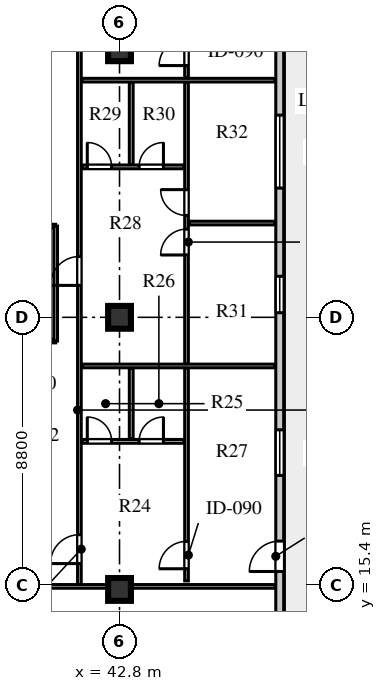
"""IFC4 building model, lengths in metres.
Left out: names, types, materials, properties, quantities, classifications, styles, units other than length and angle.
Written with IfcOpenShell. Run it as: python <this file> out.ifc"""

import sys

from ifc_helpers import new_model, si_unit, direction, frame, frame_2d, origin, origin_2d, place, context, subcontext, project, spatial, rectangle, extrude, element, fill, save


model = new_model("IFC4")
c1 = context("Model", 3, precision=1e-05, world=origin(), true_north=direction((0.0, 1.0)))
c2 = subcontext(c1, "Body", "Model", "MODEL_VIEW")
j1 = project(units=[si_unit("LENGTHUNIT", "METRE"), si_unit("PLANEANGLEUNIT", "RADIAN")], contexts=[c1])
p1 = place(None, origin())
s1 = spatial("IfcSite", under=j1, at=p1, CompositionType="ELEMENT")
p2 = place(p1, origin())
s2 = spatial("IfcBuilding", under=s1, at=p2, CompositionType="ELEMENT")
p3 = place(p2, frame((0.0, 0.0, 288.2)))
s3 = spatial("IfcBuildingStorey", under=s2, at=p3, CompositionType="ELEMENT", Elevation=288.2)
for number, where, z_axis, x_axis in (
    (1, (42.8, 15.25, 0.0), (0.0, 0.0, 1.0), (1.0, 0.0, 0.0)),
    (2, (42.8, 24.2, 0.0), (0.0, 0.0, 1.0), (1.0, 0.0, 0.0)),
    (3, (42.8, 33.0, 0.0), (0.0, 0.0, 1.0), (1.0, 0.0, 0.0)),
):
    element("IfcColumn", number, at=place(p3, frame(where, z_axis=z_axis, x_axis=x_axis)), inside=s3, PredefinedType="COLUMN", context=c2, shape_type="SweptSolid", body=[
        extrude(rectangle(XDim=0.75, YDim=0.75, at=origin_2d()), origin(), (0.0, 0.0, 1.0), 3.66),
    ])
p4 = place(p3, frame((48.07, 13.41, 0.0), z_axis=(0.0, 0.0, 1.0), x_axis=(0.0, 1.0, 0.0)))
e4 = element("IfcWall", 4, at=p4, inside=s3, PredefinedType="SOLIDWALL", context=c2, shape_type="SweptSolid", body=[
    extrude(rectangle(XDim=30.38, YDim=0.26, at=frame_2d((15.19, 0.0))), origin(), (0.0, 0.0, 1.0), 3.66),
])
p5 = place(p4, frame((2.43, 0.0, 0.0)))
e5 = element("IfcOpeningElement", 5, at=p5, cuts=e4, PredefinedType="OPENING", context=c2, shape_type="SweptSolid", body=[
    extrude(rectangle(XDim=1.0, YDim=2.05, at=frame_2d((0.5, 1.025))), frame((0.0, 0.14, 0.0), z_axis=(0.0, -1.0, 0.0), x_axis=(1.0, 0.0, 0.0)), (0.0, 0.0, 1.0), 0.28),
])
p6 = place(p4, frame((5.59, 0.0, 0.8)))
e6 = element("IfcOpeningElement", 6, at=p6, cuts=e4, PredefinedType="OPENING", context=c2, shape_type="SweptSolid", body=[
    extrude(rectangle(XDim=1.5, YDim=2.0, at=frame_2d((0.75, 1.0))), frame((0.0, 0.14, 0.0), z_axis=(0.0, -1.0, 0.0), x_axis=(1.0, 0.0, 0.0)), (0.0, 0.0, 1.0), 0.28),
])
p7 = place(p4, frame((10.94, 0.0, 0.8)))
e7 = element("IfcOpeningElement", 7, at=p7, cuts=e4, PredefinedType="OPENING", context=c2, shape_type="SweptSolid", body=[
    extrude(rectangle(XDim=1.2, YDim=1.75, at=frame_2d((0.6, 0.875))), frame((0.0, 0.14, 0.0), z_axis=(0.0, -1.0, 0.0), x_axis=(1.0, 0.0, 0.0)), (0.0, 0.0, 1.0), 0.28),
])
p8 = place(p4, frame((15.04, 0.0, 0.8)))
e8 = element("IfcOpeningElement", 8, at=p8, cuts=e4, PredefinedType="OPENING", context=c2, shape_type="SweptSolid", body=[
    extrude(rectangle(XDim=2.4, YDim=2.05, at=frame_2d((1.2, 1.025))), frame((0.0, 0.14, 0.0), z_axis=(0.0, -1.0, 0.0), x_axis=(1.0, 0.0, 0.0)), (0.0, 0.0, 1.0), 0.28),
])
p9 = place(p4, frame((22.465, 0.0, 0.8)))
e9 = element("IfcOpeningElement", 9, at=p9, cuts=e4, PredefinedType="OPENING", context=c2, shape_type="SweptSolid", body=[
    extrude(rectangle(XDim=2.1, YDim=1.95, at=frame_2d((1.05, 0.975))), frame((0.0, 0.14, 0.0), z_axis=(0.0, -1.0, 0.0), x_axis=(1.0, 0.0, 0.0)), (0.0, 0.0, 1.0), 0.28),
])
p10 = place(p3, frame((41.48, 15.35, 0.0), z_axis=(0.0, 0.0, 1.0), x_axis=(0.0, 1.0, 0.0)))
e10 = element("IfcWall", 10, at=p10, inside=s3, PredefinedType="PARTITIONING", context=c2, shape_type="SweptSolid", body=[
    extrude(rectangle(XDim=26.5, YDim=0.12, at=frame_2d((13.25, 0.0))), origin(), (0.0, 0.0, 1.0), 3.66),
])
p11 = place(p10, frame((0.75, 0.0, 0.0)))
e11 = element("IfcOpeningElement", 11, at=p11, cuts=e10, PredefinedType="OPENING", context=c2, shape_type="SweptSolid", body=[
    extrude(rectangle(XDim=0.95, YDim=2.1, at=frame_2d((0.475, 1.05))), frame((0.0, 0.07, 0.0), z_axis=(0.0, -1.0, 0.0), x_axis=(1.0, 0.0, 0.0)), (0.0, 0.0, 1.0), 0.14),
])
p12 = place(p10, frame((9.9, 0.0, 0.0)))
e12 = element("IfcOpeningElement", 12, at=p12, cuts=e10, PredefinedType="OPENING", context=c2, shape_type="SweptSolid", body=[
    extrude(rectangle(XDim=0.95, YDim=2.1, at=frame_2d((0.475, 1.05))), frame((0.0, 0.07, 0.0), z_axis=(0.0, -1.0, 0.0), x_axis=(1.0, 0.0, 0.0)), (0.0, 0.0, 1.0), 0.14),
])
p13 = place(p10, frame((18.35, 0.0, 0.0)))
e13 = element("IfcOpeningElement", 13, at=p13, cuts=e10, PredefinedType="OPENING", context=c2, shape_type="SweptSolid", body=[
    extrude(rectangle(XDim=0.95, YDim=2.1, at=frame_2d((0.475, 1.05))), frame((0.0, 0.07, 0.0), z_axis=(0.0, -1.0, 0.0), x_axis=(1.0, 0.0, 0.0)), (0.0, 0.0, 1.0), 0.14),
])
p14 = place(p3, frame((39.15, 15.35, 0.0), z_axis=(0.0, 0.0, 1.0), x_axis=(1.0, 0.0, 0.0)))
e14 = element("IfcWall", 14, at=p14, inside=s3, PredefinedType="PARTITIONING", context=c2, shape_type="SweptSolid", body=[
    extrude(rectangle(XDim=8.77, YDim=0.12, at=frame_2d((4.385, 0.0))), origin(), (0.0, 0.0, 1.0), 3.06),
])
p15 = place(p3, frame((45.004, 15.53, 0.0), z_axis=(0.0, 0.0, 1.0), x_axis=(0.0, 1.0, 0.0)))
e15 = element("IfcWall", 15, at=p15, inside=s3, PredefinedType="PARTITIONING", context=c2, shape_type="SweptSolid", body=[
    extrude(rectangle(XDim=6.99, YDim=0.12, at=frame_2d((3.495, 0.0))), origin(), (0.0, 0.0, 1.0), 3.66),
])
p16 = place(p15, frame((0.4, 0.0, 0.0)))
e16 = element("IfcOpeningElement", 16, at=p16, cuts=e15, PredefinedType="OPENING", context=c2, shape_type="SweptSolid", body=[
    extrude(rectangle(XDim=0.9, YDim=2.08, at=frame_2d((0.45, 1.04))), frame((0.0, 0.07, 0.0), z_axis=(0.0, -1.0, 0.0), x_axis=(1.0, 0.0, 0.0)), (0.0, 0.0, 1.0), 0.14),
])
p17 = place(p3, frame((41.58, 20.12, 0.0), z_axis=(0.0, 0.0, 1.0), x_axis=(1.0, 0.0, 0.0)))
e17 = element("IfcWall", 17, at=p17, inside=s3, PredefinedType="PLUMBINGWALL", context=c2, shape_type="SweptSolid", body=[
    extrude(rectangle(XDim=3.344, YDim=0.125, at=frame_2d((1.672, 0.0))), origin(), (0.0, 0.0, 1.0), 3.66),
])
p18 = place(p17, frame((0.16, 0.0, 0.0)))
e18 = element("IfcOpeningElement", 18, at=p18, cuts=e17, PredefinedType="OPENING", context=c2, shape_type="SweptSolid", body=[
    extrude(rectangle(XDim=0.8, YDim=2.05, at=frame_2d((0.4, 1.025))), frame((0.0, 0.073, 0.0), z_axis=(0.0, -1.0, 0.0), x_axis=(1.0, 0.0, 0.0)), (0.0, 0.0, 1.0), 0.145),
])
p19 = place(p17, frame((1.865, 0.0, 0.0)))
e19 = element("IfcOpeningElement", 19, at=p19, cuts=e17, PredefinedType="OPENING", context=c2, shape_type="SweptSolid", body=[
    extrude(rectangle(XDim=0.8, YDim=2.05, at=frame_2d((0.4, 1.025))), frame((0.0, 0.073, 0.0), z_axis=(0.0, -1.0, 0.0), x_axis=(1.0, 0.0, 0.0)), (0.0, 0.0, 1.0), 0.145),
])
p20 = place(p3, frame((43.185, 20.2, 0.0), z_axis=(0.0, 0.0, 1.0), x_axis=(0.0, 1.0, 0.0)))
e20 = element("IfcWall", 20, at=p20, inside=s3, PredefinedType="PLUMBINGWALL", context=c2, shape_type="SweptSolid", body=[
    extrude(rectangle(XDim=2.32, YDim=0.125, at=frame_2d((1.16, 0.0))), origin(), (0.0, 0.0, 1.0), 3.66),
])
p21 = place(p3, frame((41.56, 22.6, 0.0), z_axis=(0.0, 0.0, 1.0), x_axis=(1.0, 0.0, 0.0)))
e21 = element("IfcWall", 21, at=p21, inside=s3, PredefinedType="PARTITIONING", context=c2, shape_type="SweptSolid", body=[
    extrude(rectangle(XDim=6.36, YDim=0.12, at=frame_2d((3.18, 0.0))), origin(), (0.0, 0.0, 1.0), 3.66),
])
p22 = place(p3, frame((45.004, 22.68, 0.0), z_axis=(0.0, 0.0, 1.0), x_axis=(0.0, 1.0, 0.0)))
e22 = element("IfcWall", 22, at=p22, inside=s3, PredefinedType="PARTITIONING", context=c2, shape_type="SweptSolid", body=[
    extrude(rectangle(XDim=9.24, YDim=0.12, at=frame_2d((4.62, 0.0))), origin(), (0.0, 0.0, 1.0), 3.66),
])
p23 = place(p22, frame((3.57, 0.0, 0.0)))
e23 = element("IfcOpeningElement", 23, at=p23, cuts=e22, PredefinedType="OPENING", context=c2, shape_type="SweptSolid", body=[
    extrude(rectangle(XDim=0.85, YDim=2.08, at=frame_2d((0.425, 1.04))), frame((0.0, 0.07, 0.0), z_axis=(0.0, -1.0, 0.0), x_axis=(1.0, 0.0, 0.0)), (0.0, 0.0, 1.0), 0.14),
])
p24 = place(p22, frame((4.87, 0.0, 0.0)))
e24 = element("IfcOpeningElement", 24, at=p24, cuts=e22, PredefinedType="OPENING", context=c2, shape_type="SweptSolid", body=[
    extrude(rectangle(XDim=0.85, YDim=2.08, at=frame_2d((0.425, 1.04))), frame((0.0, 0.07, 0.0), z_axis=(0.0, -1.0, 0.0), x_axis=(1.0, 0.0, 0.0)), (0.0, 0.0, 1.0), 0.14),
])
p25 = place(p3, frame((41.58, 29.148, 0.0), z_axis=(0.0, 0.0, 1.0), x_axis=(1.0, 0.0, 0.0)))
e25 = element("IfcWall", 25, at=p25, inside=s3, PredefinedType="PLUMBINGWALL", context=c2, shape_type="SweptSolid", body=[
    extrude(rectangle(XDim=3.344, YDim=0.125, at=frame_2d((1.672, 0.0))), origin(), (0.0, 0.0, 1.0), 3.66),
])
p26 = place(p25, frame((0.16, 0.0, 0.0)))
e26 = element("IfcOpeningElement", 26, at=p26, cuts=e25, PredefinedType="OPENING", context=c2, shape_type="SweptSolid", body=[
    extrude(rectangle(XDim=0.8, YDim=2.05, at=frame_2d((0.4, 1.025))), frame((0.0, 0.073, 0.0), z_axis=(0.0, -1.0, 0.0), x_axis=(1.0, 0.0, 0.0)), (0.0, 0.0, 1.0), 0.145),
])
p27 = place(p25, frame((1.865, 0.0, 0.0)))
e27 = element("IfcOpeningElement", 27, at=p27, cuts=e25, PredefinedType="OPENING", context=c2, shape_type="SweptSolid", body=[
    extrude(rectangle(XDim=0.8, YDim=2.05, at=frame_2d((0.4, 1.025))), frame((0.0, 0.073, 0.0), z_axis=(0.0, -1.0, 0.0), x_axis=(1.0, 0.0, 0.0)), (0.0, 0.0, 1.0), 0.145),
])
p28 = place(p3, frame((43.185, 29.228, 0.0), z_axis=(0.0, 0.0, 1.0), x_axis=(0.0, 1.0, 0.0)))
e28 = element("IfcWall", 28, at=p28, inside=s3, PredefinedType="PLUMBINGWALL", context=c2, shape_type="SweptSolid", body=[
    extrude(rectangle(XDim=2.692, YDim=0.125, at=frame_2d((1.346, 0.0))), origin(), (0.0, 0.0, 1.0), 3.66),
])
p29 = place(p3, frame((45.084, 27.3, 0.0), z_axis=(0.0, 0.0, 1.0), x_axis=(1.0, 0.0, 0.0)))
e29 = element("IfcWall", 29, at=p29, inside=s3, PredefinedType="PARTITIONING", context=c2, shape_type="SweptSolid", body=[
    extrude(rectangle(XDim=2.836, YDim=0.12, at=frame_2d((1.418, 0.0))), origin(), (0.0, 0.0, 1.0), 3.66),
])
p30 = place(p3, frame((41.56, 32.0, 0.0), z_axis=(0.0, 0.0, 1.0), x_axis=(1.0, 0.0, 0.0)))
e30 = element("IfcWall", 30, at=p30, inside=s3, PredefinedType="PARTITIONING", context=c2, shape_type="SweptSolid", body=[
    extrude(rectangle(XDim=6.36, YDim=0.12, at=frame_2d((3.18, 0.0))), origin(), (0.0, 0.0, 1.0), 3.66),
])
p31 = place(p3, frame((45.004, 32.08, 0.0), z_axis=(0.0, 0.0, 1.0), x_axis=(0.0, 1.0, 0.0)))
e31 = element("IfcWall", 31, at=p31, inside=s3, PredefinedType="PARTITIONING", context=c2, shape_type="SweptSolid", body=[
    extrude(rectangle(XDim=9.59, YDim=0.12, at=frame_2d((4.795, 0.0))), origin(), (0.0, 0.0, 1.0), 3.66),
])
p32 = place(p31, frame((0.4, 0.0, 0.0)))
e32 = element("IfcOpeningElement", 32, at=p32, cuts=e31, PredefinedType="OPENING", context=c2, shape_type="SweptSolid", body=[
    extrude(rectangle(XDim=0.9, YDim=2.08, at=frame_2d((0.45, 1.04))), frame((0.0, 0.07, 0.0), z_axis=(0.0, -1.0, 0.0), x_axis=(1.0, 0.0, 0.0)), (0.0, 0.0, 1.0), 0.14),
])
p33 = place(p3, frame((34.8, 23.42, 0.0), z_axis=(0.0, 0.0, 1.0), x_axis=(1.0, 0.0, 0.0)))
e33 = element("IfcWall", 33, at=p33, inside=s3, PredefinedType="PARTITIONING", context=c2, shape_type="SweptSolid", body=[
    extrude(rectangle(XDim=5.9, YDim=0.12, at=frame_2d((2.95, 0.0))), origin(), (0.0, 0.0, 1.0), 3.66),
])
p34 = place(p33, frame((0.43, 0.0, 0.0)))
e34 = element("IfcOpeningElement", 34, at=p34, cuts=e33, PredefinedType="OPENING", context=c2, shape_type="SweptSolid", body=[
    extrude(rectangle(XDim=0.8, YDim=2.05, at=frame_2d((0.4, 1.025))), frame((0.0, 0.07, 0.0), z_axis=(0.0, -1.0, 0.0), x_axis=(1.0, 0.0, 0.0)), (0.0, 0.0, 1.0), 0.14),
])
p35 = place(p33, frame((3.3, 0.0, 0.0)))
e35 = element("IfcOpeningElement", 35, at=p35, cuts=e33, PredefinedType="OPENING", context=c2, shape_type="SweptSolid", body=[
    extrude(rectangle(XDim=0.8, YDim=2.05, at=frame_2d((0.4, 1.025))), frame((0.0, 0.07, 0.0), z_axis=(0.0, -1.0, 0.0), x_axis=(1.0, 0.0, 0.0)), (0.0, 0.0, 1.0), 0.14),
])
p36 = place(p3, frame((34.8, 27.2, 0.0), z_axis=(0.0, 0.0, 1.0), x_axis=(1.0, 0.0, 0.0)))
e36 = element("IfcWall", 36, at=p36, inside=s3, PredefinedType="PARTITIONING", context=c2, shape_type="SweptSolid", body=[
    extrude(rectangle(XDim=5.9, YDim=0.12, at=frame_2d((2.95, 0.0))), origin(), (0.0, 0.0, 1.0), 3.36),
])
p37 = place(p3, frame((40.7, 23.42, 0.0), z_axis=(0.0, 0.0, 1.0), x_axis=(0.0, 1.0, 0.0)))
e37 = element("IfcWall", 37, at=p37, inside=s3, PredefinedType="PARTITIONING", context=c2, shape_type="SweptSolid", body=[
    extrude(rectangle(XDim=3.78, YDim=0.12, at=frame_2d((1.89, 0.0))), origin(), (0.0, 0.0, 1.0), 3.66),
])
p38 = place(p5, frame((1.0, 0.0, 0.0), z_axis=(0.0, 0.0, 1.0), x_axis=(-1.0, 0.0, 0.0)))
e38 = element("IfcDoor", 38, at=p38, inside=s3, OperationType="SINGLE_SWING_RIGHT", PredefinedType="DOOR", context=c2, shape_type="SweptSolid", body=[
    extrude(rectangle(XDim=1.0, YDim=2.05, at=frame_2d((0.5, 1.025))), frame((0.0, 0.025, 0.0), z_axis=(0.0, -1.0, 0.0), x_axis=(1.0, 0.0, 0.0)), (0.0, 0.0, 1.0), 0.05),
])
fill(e5, e38)
p39 = place(p6, origin())
e39 = element("IfcWindow", 39, at=p39, inside=s3, PartitioningType="SINGLE_PANEL", PredefinedType="WINDOW", context=c2, shape_type="SweptSolid", body=[
    extrude(rectangle(XDim=1.5, YDim=2.0, at=frame_2d((0.75, 1.0))), frame((0.0, 0.03, 0.0), z_axis=(0.0, -1.0, 0.0), x_axis=(1.0, 0.0, 0.0)), (0.0, 0.0, 1.0), 0.06),
])
fill(e6, e39)
p40 = place(p7, origin())
e40 = element("IfcWindow", 40, at=p40, inside=s3, PartitioningType="SINGLE_PANEL", PredefinedType="WINDOW", context=c2, shape_type="SweptSolid", body=[
    extrude(rectangle(XDim=1.2, YDim=1.75, at=frame_2d((0.6, 0.875))), frame((0.0, 0.03, 0.0), z_axis=(0.0, -1.0, 0.0), x_axis=(1.0, 0.0, 0.0)), (0.0, 0.0, 1.0), 0.06),
])
fill(e7, e40)
p41 = place(p8, origin())
e41 = element("IfcWindow", 41, at=p41, inside=s3, PartitioningType="SINGLE_PANEL", PredefinedType="WINDOW", context=c2, shape_type="SweptSolid", body=[
    extrude(rectangle(XDim=2.4, YDim=2.05, at=frame_2d((1.2, 1.025))), frame((0.0, 0.03, 0.0), z_axis=(0.0, -1.0, 0.0), x_axis=(1.0, 0.0, 0.0)), (0.0, 0.0, 1.0), 0.06),
])
fill(e8, e41)
p42 = place(p18, origin())
e42 = element("IfcDoor", 42, at=p42, inside=s3, OperationType="SINGLE_SWING_LEFT", PredefinedType="DOOR", context=c2, shape_type="SweptSolid", body=[
    extrude(rectangle(XDim=0.8, YDim=2.05, at=frame_2d((0.4, 1.025))), frame((0.0, 0.025, 0.0), z_axis=(0.0, -1.0, 0.0), x_axis=(1.0, 0.0, 0.0)), (0.0, 0.0, 1.0), 0.05),
])
fill(e18, e42)
p43 = place(p19, origin())
e43 = element("IfcDoor", 43, at=p43, inside=s3, OperationType="SINGLE_SWING_RIGHT", PredefinedType="DOOR", context=c2, shape_type="SweptSolid", body=[
    extrude(rectangle(XDim=0.8, YDim=2.05, at=frame_2d((0.4, 1.025))), frame((0.0, 0.025, 0.0), z_axis=(0.0, -1.0, 0.0), x_axis=(1.0, 0.0, 0.0)), (0.0, 0.0, 1.0), 0.05),
])
fill(e19, e43)
p44 = place(p16, origin())
e44 = element("IfcDoor", 44, at=p44, inside=s3, OperationType="SINGLE_SWING_LEFT", PredefinedType="DOOR", context=c2, shape_type="SweptSolid", body=[
    extrude(rectangle(XDim=0.9, YDim=2.08, at=frame_2d((0.45, 1.04))), frame((0.0, 0.025, 0.0), z_axis=(0.0, -1.0, 0.0), x_axis=(1.0, 0.0, 0.0)), (0.0, 0.0, 1.0), 0.05),
])
fill(e16, e44)
p45 = place(p11, origin())
e45 = element("IfcDoor", 45, at=p45, inside=s3, OperationType="SINGLE_SWING_LEFT", PredefinedType="DOOR", context=c2, shape_type="SweptSolid", body=[
    extrude(rectangle(XDim=0.95, YDim=2.1, at=frame_2d((0.475, 1.05))), frame((0.0, 0.025, 0.0), z_axis=(0.0, -1.0, 0.0), x_axis=(1.0, 0.0, 0.0)), (0.0, 0.0, 1.0), 0.05),
])
fill(e11, e45)
p46 = place(p26, origin())
e46 = element("IfcDoor", 46, at=p46, inside=s3, OperationType="SINGLE_SWING_LEFT", PredefinedType="DOOR", context=c2, shape_type="SweptSolid", body=[
    extrude(rectangle(XDim=0.8, YDim=2.05, at=frame_2d((0.4, 1.025))), frame((0.0, 0.025, 0.0), z_axis=(0.0, -1.0, 0.0), x_axis=(1.0, 0.0, 0.0)), (0.0, 0.0, 1.0), 0.05),
])
fill(e26, e46)
p47 = place(p27, origin())
e47 = element("IfcDoor", 47, at=p47, inside=s3, OperationType="SINGLE_SWING_RIGHT", PredefinedType="DOOR", context=c2, shape_type="SweptSolid", body=[
    extrude(rectangle(XDim=0.8, YDim=2.05, at=frame_2d((0.4, 1.025))), frame((0.0, 0.025, 0.0), z_axis=(0.0, -1.0, 0.0), x_axis=(1.0, 0.0, 0.0)), (0.0, 0.0, 1.0), 0.05),
])
fill(e27, e47)
p48 = place(p23, origin())
e48 = element("IfcDoor", 48, at=p48, inside=s3, OperationType="SINGLE_SWING_LEFT", PredefinedType="DOOR", context=c2, shape_type="SweptSolid", body=[
    extrude(rectangle(XDim=0.85, YDim=2.08, at=frame_2d((0.425, 1.04))), frame((0.0, 0.025, 0.0), z_axis=(0.0, -1.0, 0.0), x_axis=(1.0, 0.0, 0.0)), (0.0, 0.0, 1.0), 0.05),
])
fill(e23, e48)
p49 = place(p24, origin())
e49 = element("IfcDoor", 49, at=p49, inside=s3, OperationType="SINGLE_SWING_RIGHT", PredefinedType="DOOR", context=c2, shape_type="SweptSolid", body=[
    extrude(rectangle(XDim=0.85, YDim=2.08, at=frame_2d((0.425, 1.04))), frame((0.0, 0.025, 0.0), z_axis=(0.0, -1.0, 0.0), x_axis=(1.0, 0.0, 0.0)), (0.0, 0.0, 1.0), 0.05),
])
fill(e24, e49)
p50 = place(p12, origin())
e50 = element("IfcDoor", 50, at=p50, inside=s3, OperationType="SINGLE_SWING_LEFT", PredefinedType="DOOR", context=c2, shape_type="SweptSolid", body=[
    extrude(rectangle(XDim=0.95, YDim=2.1, at=frame_2d((0.475, 1.05))), frame((0.0, 0.025, 0.0), z_axis=(0.0, -1.0, 0.0), x_axis=(1.0, 0.0, 0.0)), (0.0, 0.0, 1.0), 0.05),
])
fill(e12, e50)
p51 = place(p32, origin())
e51 = element("IfcDoor", 51, at=p51, inside=s3, OperationType="SINGLE_SWING_LEFT", PredefinedType="DOOR", context=c2, shape_type="SweptSolid", body=[
    extrude(rectangle(XDim=0.9, YDim=2.08, at=frame_2d((0.45, 1.04))), frame((0.0, 0.025, 0.0), z_axis=(0.0, -1.0, 0.0), x_axis=(1.0, 0.0, 0.0)), (0.0, 0.0, 1.0), 0.05),
])
fill(e32, e51)
save(model, sys.argv[1])
